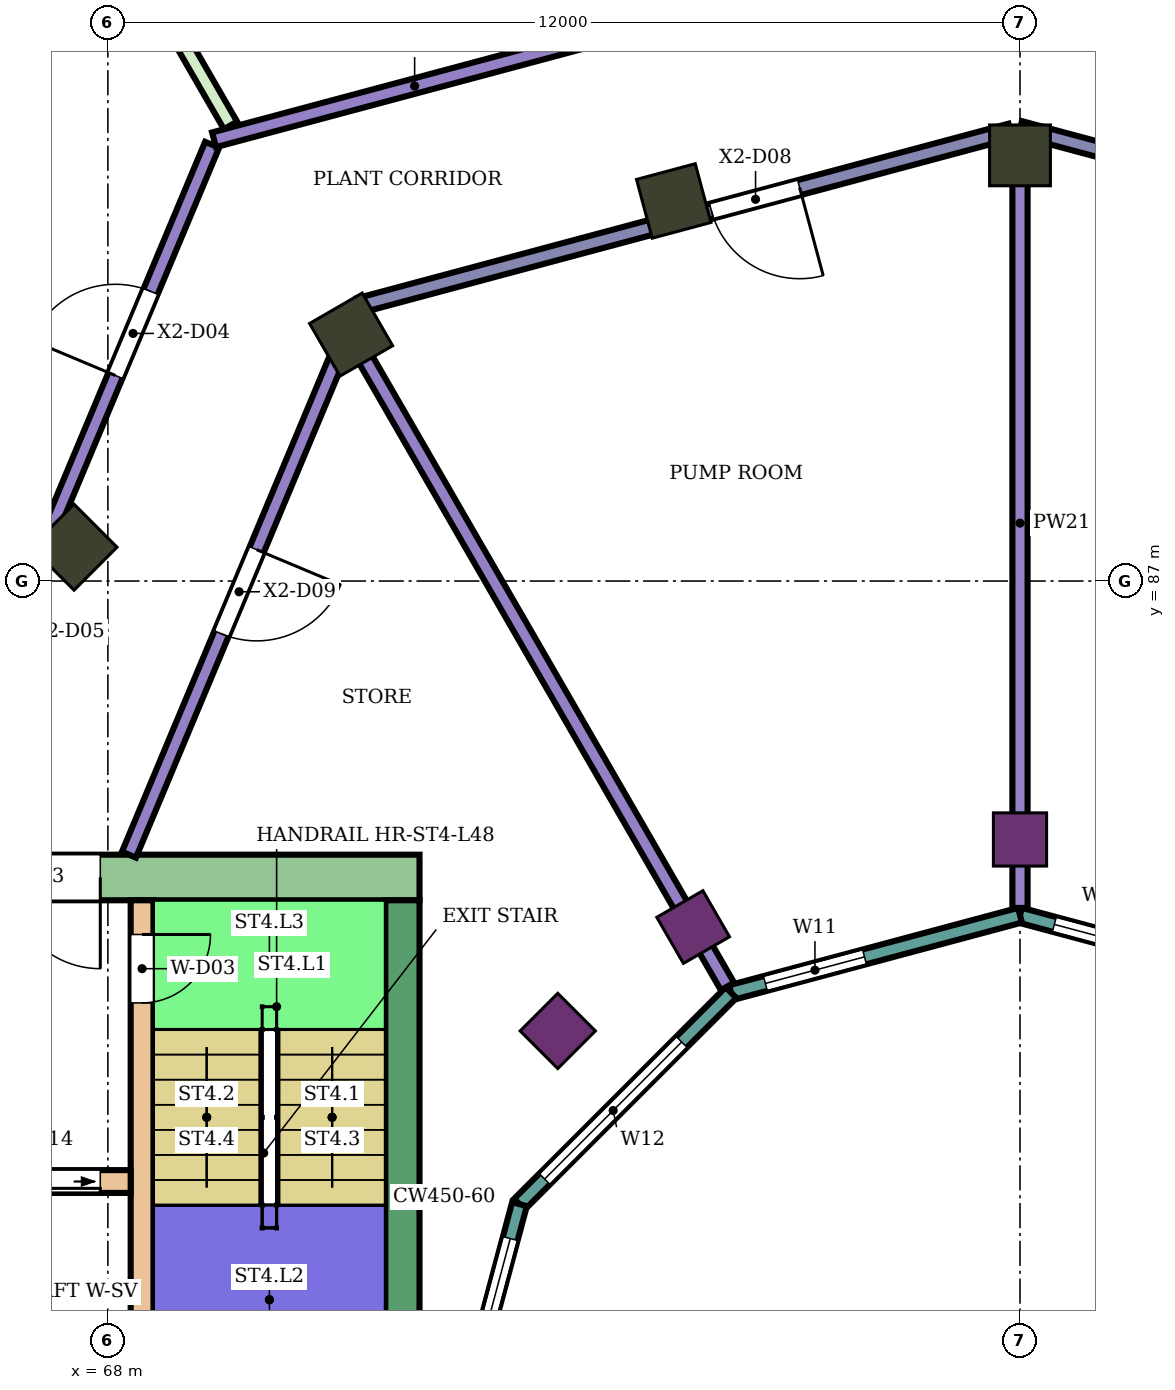
"""IFC4 building model, lengths in metres.
Left out: names, types, materials, properties, quantities, classifications, styles, units other than length and angle.
Written with IfcOpenShell. Run it as: python <this file> out.ifc"""

import sys

from ifc_helpers import new_model, si_unit, direction, frame, frame_2d, origin, origin_2d, place, context, subcontext, project, spatial, rectangle, extrude, element, fill, save


model = new_model("IFC4")
c1 = context("Model", 3, precision=1e-05, world=origin(), true_north=direction((0.0, 1.0)))
c2 = subcontext(c1, "Body", "Model", "MODEL_VIEW")
j1 = project(units=[si_unit("LENGTHUNIT", "METRE"), si_unit("PLANEANGLEUNIT", "RADIAN")], contexts=[c1])
p1 = place(None, origin())
s1 = spatial("IfcSite", under=j1, at=p1, CompositionType="ELEMENT")
p2 = place(p1, origin())
s2 = spatial("IfcBuilding", under=s1, at=p2, CompositionType="ELEMENT")
p3 = place(p2, frame((0.0, 0.0, 206.9)))
s3 = spatial("IfcBuildingStorey", under=s2, at=p3, CompositionType="ELEMENT", Elevation=206.9)
for number, where, z_axis, x_axis in (
    (1, (80.0, 92.6, 0.0), (0.0, 0.0, 1.0), (0.0, 1.0, 0.0)),
    (2, (75.445, 92.0, 0.0), (0.0, 0.0, 1.0), (-0.259, 0.966, 0.0)),
    (3, (71.2, 90.242, 0.0), (0.0, 0.0, 1.0), (-0.5, 0.866, 0.0)),
    (4, (67.555, 87.445, 0.0), (0.0, 0.0, 1.0), (-0.707, 0.707, 0.0)),
):
    element("IfcColumn", number, at=place(p3, frame(where, z_axis=z_axis, x_axis=x_axis)), inside=s3, PredefinedType="COLUMN", context=c2, shape_type="SweptSolid", body=[
        extrude(rectangle(XDim=0.8, YDim=0.8, at=origin_2d()), origin(), (0.0, 0.0, 1.0), 5.6),
    ])
for number, where, z_axis, x_axis in (
    (5, (80.0, 83.6, 0.0), (0.0, 0.0, 1.0), (0.0, 1.0, 0.0)),
    (6, (75.7, 82.448, 0.0), (0.0, 0.0, 1.0), (-0.5, 0.866, 0.0)),
    (7, (73.919, 81.081, 0.0), (0.0, 0.0, 1.0), (-0.707, 0.707, 0.0)),
):
    element("IfcColumn", number, at=place(p3, frame(where, z_axis=z_axis, x_axis=x_axis)), inside=s3, PredefinedType="COLUMN", context=c2, shape_type="SweptSolid", body=[
        extrude(rectangle(XDim=0.7, YDim=0.7, at=origin_2d()), origin(), (0.0, 0.0, 1.0), 5.6),
    ])
p4 = place(p3, frame((72.1, 83.1, 0.0), z_axis=(0.0, 0.0, 1.0), x_axis=(-1.0, 0.0, 0.0)))
e8 = element("IfcWall", 8, at=p4, inside=s3, PredefinedType="SHEAR", context=c2, shape_type="SweptSolid", body=[
    extrude(rectangle(XDim=14.9, YDim=0.6, at=frame_2d((7.45, 0.0))), origin(), (0.0, 0.0, 1.0), 5.28),
])
p5 = place(p4, frame((4.2, 0.0, 0.0)))
e9 = element("IfcOpeningElement", 9, at=p5, cuts=e8, PredefinedType="OPENING", context=c2, shape_type="SweptSolid", body=[
    extrude(rectangle(XDim=2.4, YDim=2.4, at=frame_2d((1.2, 1.2))), frame((0.0, 0.31, 0.0), z_axis=(0.0, -1.0, 0.0), x_axis=(1.0, 0.0, 0.0)), (0.0, 0.0, 1.0), 0.62),
])
p6 = place(p3, frame((71.875, 82.8, 0.0), z_axis=(0.0, 0.0, 1.0), x_axis=(0.0, -1.0, 0.0)))
e10 = element("IfcWall", 10, at=p6, inside=s3, PredefinedType="SHEAR", context=c2, shape_type="SweptSolid", body=[
    extrude(rectangle(XDim=7.8, YDim=0.45, at=frame_2d((3.9, 0.0))), origin(), (0.0, 0.0, 1.0), 5.28),
])
p7 = place(p3, frame((68.45, 82.8, 0.0), z_axis=(0.0, 0.0, 1.0), x_axis=(0.0, -1.0, 0.0)))
e11 = element("IfcWall", 11, at=p7, inside=s3, PredefinedType="SHEAR", context=c2, shape_type="SweptSolid", body=[
    extrude(rectangle(XDim=7.8, YDim=0.3, at=frame_2d((3.9, 0.0))), origin(), (0.0, 0.0, 1.0), 5.28),
])
p8 = place(p7, frame((0.45, 0.0, 0.0)))
e12 = element("IfcOpeningElement", 12, at=p8, cuts=e11, PredefinedType="OPENING", context=c2, shape_type="SweptSolid", body=[
    extrude(rectangle(XDim=0.9, YDim=2.1, at=frame_2d((0.45, 1.05))), frame((0.0, 0.16, 0.0), z_axis=(0.0, -1.0, 0.0), x_axis=(1.0, 0.0, 0.0)), (0.0, 0.0, 1.0), 0.32),
])
p9 = place(p3, frame((68.3, 79.1, 0.0), z_axis=(0.0, 0.0, 1.0), x_axis=(-1.0, 0.0, 0.0)))
e13 = element("IfcWall", 13, at=p9, inside=s3, PredefinedType="SHEAR", context=c2, shape_type="SweptSolid", body=[
    extrude(rectangle(XDim=11.1, YDim=0.3, at=frame_2d((5.55, 0.0))), origin(), (0.0, 0.0, 1.0), 5.28),
])
p10 = place(p9, frame((0.4, 0.0, 0.0)))
e14 = element("IfcOpeningElement", 14, at=p10, cuts=e13, PredefinedType="OPENING", context=c2, shape_type="SweptSolid", body=[
    extrude(rectangle(XDim=1.4, YDim=2.1, at=frame_2d((0.7, 1.05))), frame((0.0, 0.16, 0.0), z_axis=(0.0, -1.0, 0.0), x_axis=(1.0, 0.0, 0.0)), (0.0, 0.0, 1.0), 0.32),
])
p11 = place(p9, frame((3.0, 0.0, 0.0)))
e15 = element("IfcOpeningElement", 15, at=p11, cuts=e13, PredefinedType="OPENING", context=c2, shape_type="SweptSolid", body=[
    extrude(rectangle(XDim=1.2, YDim=2.1, at=frame_2d((0.6, 1.05))), frame((0.0, 0.16, 0.0), z_axis=(0.0, -1.0, 0.0), x_axis=(1.0, 0.0, 0.0)), (0.0, 0.0, 1.0), 0.32),
])
p12 = place(p9, frame((6.075, 0.0, 0.0)))
e16 = element("IfcOpeningElement", 16, at=p12, cuts=e13, PredefinedType="OPENING", context=c2, shape_type="SweptSolid", body=[
    extrude(rectangle(XDim=0.9, YDim=2.1, at=frame_2d((0.45, 1.05))), frame((0.0, 0.16, 0.0), z_axis=(0.0, -1.0, 0.0), x_axis=(1.0, 0.0, 0.0)), (0.0, 0.0, 1.0), 0.32),
])
p13 = place(p9, frame((9.125, 0.0, 0.0)))
e17 = element("IfcOpeningElement", 17, at=p13, cuts=e13, PredefinedType="OPENING", context=c2, shape_type="SweptSolid", body=[
    extrude(rectangle(XDim=0.9, YDim=2.1, at=frame_2d((0.45, 1.05))), frame((0.0, 0.16, 0.0), z_axis=(0.0, -1.0, 0.0), x_axis=(1.0, 0.0, 0.0)), (0.0, 0.0, 1.0), 0.32),
])
p14 = place(p3, frame((83.802, 81.585, 0.0), z_axis=(0.0, 0.0, 1.0), x_axis=(-0.965933654434, 0.258789828301, 0.0)))
e18 = element("IfcWall", 18, at=p14, inside=s3, PredefinedType="NOTDEFINED", context=c2, shape_type="SweptSolid", body=[
    extrude(rectangle(XDim=3.936, YDim=0.2, at=frame_2d((1.968, 0.0))), origin(), (0.0, 0.0, 1.0), 5.6),
])
p15 = place(p14, frame((2.118, 0.0, 0.9)))
e19 = element("IfcOpeningElement", 19, at=p15, cuts=e18, PredefinedType="OPENING", context=c2, shape_type="SweptSolid", body=[
    extrude(rectangle(XDim=1.35, YDim=2.3, at=frame_2d((0.675, 1.15))), frame((0.0, 0.11, 0.0), z_axis=(0.0, -1.0, 0.0), x_axis=(1.0, 0.0, 0.0)), (0.0, 0.0, 1.0), 0.22),
])
p16 = place(p3, frame((80.0, 82.604, 0.0), z_axis=(0.0, 0.0, 1.0), x_axis=(-0.965933654434, -0.258789828301, 0.0)))
e20 = element("IfcWall", 20, at=p16, inside=s3, PredefinedType="NOTDEFINED", context=c2, shape_type="SweptSolid", body=[
    extrude(rectangle(XDim=3.936, YDim=0.2, at=frame_2d((1.968, 0.0))), origin(), (0.0, 0.0, 1.0), 5.6),
])
p17 = place(p16, frame((2.118, 0.0, 0.9)))
e21 = element("IfcOpeningElement", 21, at=p17, cuts=e20, PredefinedType="OPENING", context=c2, shape_type="SweptSolid", body=[
    extrude(rectangle(XDim=1.35, YDim=2.3, at=frame_2d((0.675, 1.15))), frame((0.0, 0.11, 0.0), z_axis=(0.0, -1.0, 0.0), x_axis=(1.0, 0.0, 0.0)), (0.0, 0.0, 1.0), 0.22),
])
p18 = place(p3, frame((76.198, 81.585, 0.0), z_axis=(0.0, 0.0, 1.0), x_axis=(-0.707106781187, -0.707106781187, 0.0)))
e22 = element("IfcWall", 22, at=p18, inside=s3, PredefinedType="NOTDEFINED", context=c2, shape_type="SweptSolid", body=[
    extrude(rectangle(XDim=3.936, YDim=0.2, at=frame_2d((1.968, 0.0))), origin(), (0.0, 0.0, 1.0), 5.6),
])
p19 = place(p18, frame((0.918, 0.0, 0.9)))
e23 = element("IfcOpeningElement", 23, at=p19, cuts=e22, PredefinedType="OPENING", context=c2, shape_type="SweptSolid", body=[
    extrude(rectangle(XDim=2.55, YDim=2.3, at=frame_2d((1.275, 1.15))), frame((0.0, 0.11, 0.0), z_axis=(0.0, -1.0, 0.0), x_axis=(1.0, 0.0, 0.0)), (0.0, 0.0, 1.0), 0.22),
])
p20 = place(p3, frame((73.415, 78.802, 0.0), z_axis=(0.0, 0.0, 1.0), x_axis=(-0.258789828301, -0.965933654434, 0.0)))
e24 = element("IfcWall", 24, at=p20, inside=s3, PredefinedType="NOTDEFINED", context=c2, shape_type="SweptSolid", body=[
    extrude(rectangle(XDim=3.936, YDim=0.2, at=frame_2d((1.968, 0.0))), origin(), (0.0, 0.0, 1.0), 5.6),
])
p21 = place(p20, frame((0.468, 0.0, 0.9)))
e25 = element("IfcOpeningElement", 25, at=p21, cuts=e24, PredefinedType="OPENING", context=c2, shape_type="SweptSolid", body=[
    extrude(rectangle(XDim=3.0, YDim=2.3, at=frame_2d((1.5, 1.15))), frame((0.0, 0.11, 0.0), z_axis=(0.0, -1.0, 0.0), x_axis=(1.0, 0.0, 0.0)), (0.0, 0.0, 1.0), 0.22),
])
p22 = place(p3, frame((66.086, 84.9, 0.0), z_axis=(0.0, 0.0, 1.0), x_axis=(0.386558053719, 0.922265076377, 0.0)))
e26 = element("IfcWall", 26, at=p22, inside=s3, PredefinedType="PARTITIONING", context=c2, shape_type="SweptSolid", body=[
    extrude(rectangle(XDim=8.5, YDim=0.2, at=frame_2d((4.25, 0.0))), origin(), (0.0, 0.0, 1.0), 5.15),
])
p23 = place(p22, frame((5.209, 0.0, 0.0)))
e27 = element("IfcOpeningElement", 27, at=p23, cuts=e26, PredefinedType="OPENING", context=c2, shape_type="SweptSolid", body=[
    extrude(rectangle(XDim=1.2, YDim=2.4, at=frame_2d((0.6, 1.2))), frame((0.0, 0.11, 0.0), z_axis=(0.0, -1.0, 0.0), x_axis=(1.0, 0.0, 0.0)), (0.0, 0.0, 1.0), 0.22),
])
p24 = place(p22, frame((0.944, 0.0, 0.0)))
e28 = element("IfcOpeningElement", 28, at=p24, cuts=e26, PredefinedType="OPENING", context=c2, shape_type="SweptSolid", body=[
    extrude(rectangle(XDim=1.2, YDim=2.4, at=frame_2d((0.6, 1.2))), frame((0.0, 0.11, 0.0), z_axis=(0.0, -1.0, 0.0), x_axis=(1.0, 0.0, 0.0)), (0.0, 0.0, 1.0), 0.22),
])
p25 = place(p3, frame((67.104, 97.343, 0.0), z_axis=(0.0, 0.0, 1.0), x_axis=(0.499904868165, -0.866080321209, 0.0)))
e29 = element("IfcWall", 29, at=p25, inside=s3, PredefinedType="PARTITIONING", context=c2, shape_type="SweptSolid", body=[
    extrude(rectangle(XDim=5.021, YDim=0.2, at=frame_2d((2.51, 0.0))), origin(), (0.0, 0.0, 1.0), 4.667),
])
p26 = place(p3, frame((68.277, 83.4, 0.0), z_axis=(0.0, 0.0, 1.0), x_axis=(0.386363382968, 0.922346646495, 0.0)))
e30 = element("IfcWall", 30, at=p26, inside=s3, PredefinedType="PARTITIONING", context=c2, shape_type="SweptSolid", body=[
    extrude(rectangle(XDim=7.762, YDim=0.2, at=frame_2d((3.881, 0.0))), origin(), (0.0, 0.0, 1.0), 5.15),
])
p27 = place(p26, frame((3.15, 0.0, 0.0)))
e31 = element("IfcOpeningElement", 31, at=p27, cuts=e30, PredefinedType="OPENING", context=c2, shape_type="SweptSolid", body=[
    extrude(rectangle(XDim=1.2, YDim=2.4, at=frame_2d((0.6, 1.2))), frame((0.0, 0.11, 0.0), z_axis=(0.0, -1.0, 0.0), x_axis=(1.0, 0.0, 0.0)), (0.0, 0.0, 1.0), 0.22),
])
p28 = place(p3, frame((69.397, 92.805, 0.0), z_axis=(0.0, 0.0, 1.0), x_axis=(0.965949547217, 0.258730501163, 0.0)))
e32 = element("IfcWall", 32, at=p28, inside=s3, PredefinedType="PARTITIONING", context=c2, shape_type="SweptSolid", body=[
    extrude(rectangle(XDim=10.927, YDim=0.2, at=frame_2d((5.463, 0.0))), origin(), (0.0, 0.0, 1.0), 5.15),
])
p29 = place(p28, frame((5.023, 0.0, 0.0)))
e33 = element("IfcOpeningElement", 33, at=p29, cuts=e32, PredefinedType="OPENING", context=c2, shape_type="SweptSolid", body=[
    extrude(rectangle(XDim=1.2, YDim=2.4, at=frame_2d((0.6, 1.2))), frame((0.0, 0.11, 0.0), z_axis=(0.0, -1.0, 0.0), x_axis=(1.0, 0.0, 0.0)), (0.0, 0.0, 1.0), 0.22),
])
p30 = place(p3, frame((71.264, 90.135, 0.0), z_axis=(0.0, 0.0, 1.0), x_axis=(0.499888168256, -0.866089960245, 0.0)))
e34 = element("IfcWall", 34, at=p30, inside=s3, PredefinedType="PARTITIONING", context=c2, shape_type="SweptSolid", body=[
    extrude(rectangle(XDim=9.778, YDim=0.2, at=frame_2d((4.889, 0.0))), origin(), (0.0, 0.0, 1.0), 5.15),
])
p31 = place(p3, frame((71.303, 90.624, 0.0), z_axis=(0.0, 0.0, 1.0), x_axis=(0.965935648904, 0.258782383822, 0.0)))
e35 = element("IfcWall", 35, at=p31, inside=s3, PredefinedType="PARTITIONING", context=c2, shape_type="SweptSolid", body=[
    extrude(rectangle(XDim=8.874, YDim=0.2, at=frame_2d((4.437, 0.0))), origin(), (0.0, 0.0, 1.0), 4.78),
])
p32 = place(p31, frame((4.802, 0.0, 0.0)))
e36 = element("IfcOpeningElement", 36, at=p32, cuts=e35, PredefinedType="OPENING", context=c2, shape_type="SweptSolid", body=[
    extrude(rectangle(XDim=1.2, YDim=2.4, at=frame_2d((0.6, 1.2))), frame((0.0, 0.11, 0.0), z_axis=(0.0, -1.0, 0.0), x_axis=(1.0, 0.0, 0.0)), (0.0, 0.0, 1.0), 0.22),
])
p33 = place(p3, frame((80.0, 82.699, 0.0), z_axis=(0.0, 0.0, 1.0), x_axis=(0.0, 1.0, 0.0)))
e37 = element("IfcWall", 37, at=p33, inside=s3, PredefinedType="PARTITIONING", context=c2, shape_type="SweptSolid", body=[
    extrude(rectangle(XDim=10.125, YDim=0.2, at=frame_2d((5.062, 0.0))), origin(), (0.0, 0.0, 1.0), 5.15),
])
p34 = place(p3, frame((80.0, 92.954, 0.0), z_axis=(0.0, 0.0, 1.0), x_axis=(0.965932194462, -0.258795277586, 0.0)))
e38 = element("IfcWall", 38, at=p34, inside=s3, PredefinedType="PARTITIONING", context=c2, shape_type="SweptSolid", body=[
    extrude(rectangle(XDim=8.934, YDim=0.2, at=frame_2d((4.467, 0.0))), origin(), (0.0, 0.0, 1.0), 4.78),
])
p35 = place(p34, frame((3.002, 0.0, 0.0)))
e39 = element("IfcOpeningElement", 39, at=p35, cuts=e38, PredefinedType="OPENING", context=c2, shape_type="SweptSolid", body=[
    extrude(rectangle(XDim=1.2, YDim=2.4, at=frame_2d((0.6, 1.2))), frame((0.0, 0.11, 0.0), z_axis=(0.0, -1.0, 0.0), x_axis=(1.0, 0.0, 0.0)), (0.0, 0.0, 1.0), 0.22),
])
p36 = place(p3, frame((80.0, 95.646, 0.0), z_axis=(0.0, 0.0, 1.0), x_axis=(0.965926044247, -0.258818231672, 0.0)))
e40 = element("IfcWall", 40, at=p36, inside=s3, PredefinedType="PARTITIONING", context=c2, shape_type="SweptSolid", body=[
    extrude(rectangle(XDim=10.597, YDim=0.2, at=frame_2d((5.298, 0.0))), origin(), (0.0, 0.0, 1.0), 5.15),
])
p37 = place(p36, frame((7.416, 0.0, 0.0)))
e41 = element("IfcOpeningElement", 41, at=p37, cuts=e40, PredefinedType="OPENING", context=c2, shape_type="SweptSolid", body=[
    extrude(rectangle(XDim=1.2, YDim=2.4, at=frame_2d((0.6, 1.2))), frame((0.0, 0.11, 0.0), z_axis=(0.0, -1.0, 0.0), x_axis=(1.0, 0.0, 0.0)), (0.0, 0.0, 1.0), 0.22),
])
p38 = place(p15, origin())
e42 = element("IfcWindow", 42, at=p38, inside=s3, PartitioningType="SINGLE_PANEL", PredefinedType="WINDOW", context=c2, shape_type="SweptSolid", body=[
    extrude(rectangle(XDim=1.35, YDim=2.3, at=frame_2d((0.675, 1.15))), frame((0.0, 0.03, 0.0), z_axis=(0.0, -1.0, 0.0), x_axis=(1.0, 0.0, 0.0)), (0.0, 0.0, 1.0), 0.06),
])
fill(e19, e42)
p39 = place(p17, origin())
e43 = element("IfcWindow", 43, at=p39, inside=s3, PartitioningType="SINGLE_PANEL", PredefinedType="WINDOW", context=c2, shape_type="SweptSolid", body=[
    extrude(rectangle(XDim=1.35, YDim=2.3, at=frame_2d((0.675, 1.15))), frame((0.0, 0.03, 0.0), z_axis=(0.0, -1.0, 0.0), x_axis=(1.0, 0.0, 0.0)), (0.0, 0.0, 1.0), 0.06),
])
fill(e21, e43)
p40 = place(p19, origin())
e44 = element("IfcWindow", 44, at=p40, inside=s3, PartitioningType="SINGLE_PANEL", PredefinedType="WINDOW", context=c2, shape_type="SweptSolid", body=[
    extrude(rectangle(XDim=2.55, YDim=2.3, at=frame_2d((1.275, 1.15))), frame((0.0, 0.03, 0.0), z_axis=(0.0, -1.0, 0.0), x_axis=(1.0, 0.0, 0.0)), (0.0, 0.0, 1.0), 0.06),
])
fill(e23, e44)
p41 = place(p21, origin())
e45 = element("IfcWindow", 45, at=p41, inside=s3, PartitioningType="SINGLE_PANEL", PredefinedType="WINDOW", context=c2, shape_type="SweptSolid", body=[
    extrude(rectangle(XDim=3.0, YDim=2.3, at=frame_2d((1.5, 1.15))), frame((0.0, 0.03, 0.0), z_axis=(0.0, -1.0, 0.0), x_axis=(1.0, 0.0, 0.0)), (0.0, 0.0, 1.0), 0.06),
])
fill(e25, e45)
p42 = place(p23, origin())
e46 = element("IfcDoor", 46, at=p42, inside=s3, OperationType="SINGLE_SWING_LEFT", PredefinedType="DOOR", context=c2, shape_type="SweptSolid", body=[
    extrude(rectangle(XDim=1.2, YDim=2.4, at=frame_2d((0.6, 1.2))), frame((0.0, 0.025, 0.0), z_axis=(0.0, -1.0, 0.0), x_axis=(1.0, 0.0, 0.0)), (0.0, 0.0, 1.0), 0.05),
])
fill(e27, e46)
p43 = place(p32, frame((1.2, 0.0, 0.0), z_axis=(0.0, 0.0, 1.0), x_axis=(-1.0, 0.0, 0.0)))
e47 = element("IfcDoor", 47, at=p43, inside=s3, OperationType="SINGLE_SWING_LEFT", PredefinedType="DOOR", context=c2, shape_type="SweptSolid", body=[
    extrude(rectangle(XDim=1.2, YDim=2.4, at=frame_2d((0.6, 1.2))), frame((0.0, 0.025, 0.0), z_axis=(0.0, -1.0, 0.0), x_axis=(1.0, 0.0, 0.0)), (0.0, 0.0, 1.0), 0.05),
])
fill(e36, e47)
p44 = place(p27, frame((1.2, 0.0, 0.0), z_axis=(0.0, 0.0, 1.0), x_axis=(-1.0, 0.0, 0.0)))
e48 = element("IfcDoor", 48, at=p44, inside=s3, OperationType="SINGLE_SWING_LEFT", PredefinedType="DOOR", context=c2, shape_type="SweptSolid", body=[
    extrude(rectangle(XDim=1.2, YDim=2.4, at=frame_2d((0.6, 1.2))), frame((0.0, 0.025, 0.0), z_axis=(0.0, -1.0, 0.0), x_axis=(1.0, 0.0, 0.0)), (0.0, 0.0, 1.0), 0.05),
])
fill(e31, e48)
p45 = place(p8, origin())
e49 = element("IfcDoor", 49, at=p45, inside=s3, OperationType="SINGLE_SWING_LEFT", PredefinedType="DOOR", context=c2, shape_type="SweptSolid", body=[
    extrude(rectangle(XDim=0.9, YDim=2.1, at=frame_2d((0.45, 1.05))), frame((0.0, 0.025, 0.0), z_axis=(0.0, -1.0, 0.0), x_axis=(1.0, 0.0, 0.0)), (0.0, 0.0, 1.0), 0.05),
])
fill(e12, e49)
p46 = place(p10, origin())
e50 = element("IfcDoor", 50, at=p46, inside=s3, OperationType="DOUBLE_DOOR_SLIDING", PredefinedType="DOOR", context=c2, shape_type="SweptSolid", body=[
    extrude(rectangle(XDim=1.4, YDim=2.1, at=frame_2d((0.7, 1.05))), frame((0.0, 0.025, 0.0), z_axis=(0.0, -1.0, 0.0), x_axis=(1.0, 0.0, 0.0)), (0.0, 0.0, 1.0), 0.05),
])
fill(e14, e50)
p47 = place(p5, origin())
e51 = element("IfcDoor", 51, at=p47, inside=s3, OperationType="DOUBLE_DOOR_SINGLE_SWING", PredefinedType="DOOR", context=c2, shape_type="SweptSolid", body=[
    extrude(rectangle(XDim=2.4, YDim=2.4, at=frame_2d((1.2, 1.2))), frame((0.0, 0.025, 0.0), z_axis=(0.0, -1.0, 0.0), x_axis=(1.0, 0.0, 0.0)), (0.0, 0.0, 1.0), 0.05),
])
fill(e9, e51)
save(model, sys.argv[1])
